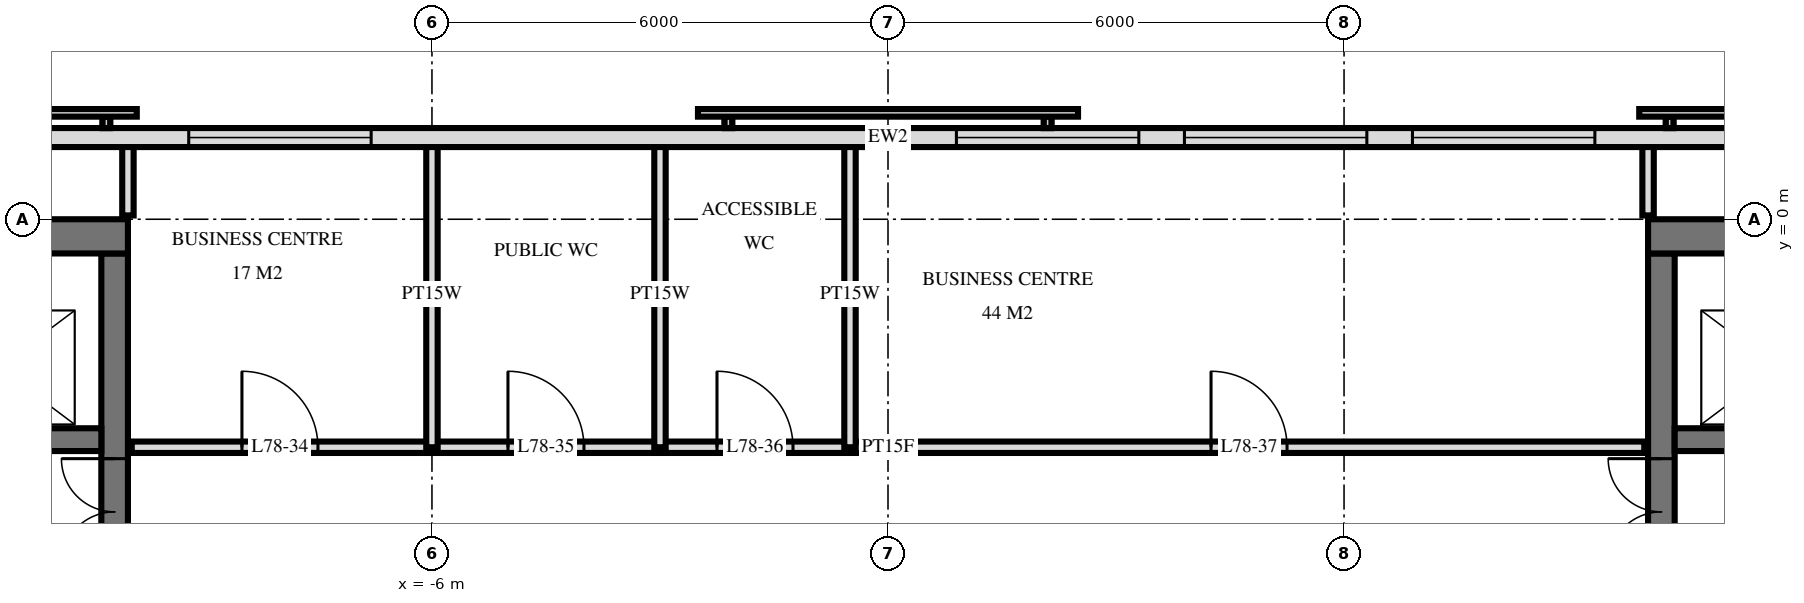
"""IFC4 building model, lengths in metres.
Left out: names, types, materials, properties, quantities, classifications, styles, units other than length and angle.
Written with IfcOpenShell. Run it as: python <this file> out.ifc"""

import sys

from ifc_helpers import new_model, si_unit, direction, frame, frame_2d, origin, place, context, subcontext, project, spatial, rectangle, extrude, element, fill, save


model = new_model("IFC4")
c1 = context("Model", 3, precision=1e-05, world=origin(), true_north=direction((0.0, 1.0)))
c2 = subcontext(c1, "Body", "Model", "MODEL_VIEW")
j1 = project(units=[si_unit("LENGTHUNIT", "METRE"), si_unit("PLANEANGLEUNIT", "RADIAN")], contexts=[c1])
p1 = place(None, origin())
s1 = spatial("IfcSite", under=j1, at=p1, CompositionType="ELEMENT")
p2 = place(p1, origin())
s2 = spatial("IfcBuilding", under=s1, at=p2, CompositionType="ELEMENT")
p3 = place(p2, frame((0.0, 0.0, 294.6)))
s3 = spatial("IfcBuildingStorey", under=s2, at=p3, CompositionType="ELEMENT", Elevation=294.6)
p4 = place(p3, frame((-19.5, -0.225, 0.0), z_axis=(0.0, 0.0, 1.0), x_axis=(1.0, 0.0, 0.0)))
e1 = element("IfcWall", 1, at=p4, inside=s3, PredefinedType="SHEAR", context=c2, shape_type="SweptSolid", body=[
    extrude(rectangle(XDim=9.5, YDim=0.45, at=frame_2d((4.75, 0.0))), origin(), (0.0, 0.0, 1.0), 3.5),
])
p5 = place(p3, frame((-10.175, -14.55, 0.0), z_axis=(0.0, 0.0, 1.0), x_axis=(0.0, 1.0, 0.0)))
e2 = element("IfcWall", 2, at=p5, inside=s3, PredefinedType="SHEAR", context=c2, shape_type="SweptSolid", body=[
    extrude(rectangle(XDim=14.1, YDim=0.35, at=frame_2d((7.05, 0.0))), origin(), (0.0, 0.0, 1.0), 3.5),
])
p6 = place(p5, frame((8.4, 0.0, 0.0)))
e3 = element("IfcOpeningElement", 3, at=p6, cuts=e2, PredefinedType="OPENING", context=c2, shape_type="SweptSolid", body=[
    extrude(rectangle(XDim=1.4, YDim=2.4, at=frame_2d((0.7, 1.2))), frame((0.0, 0.185, 0.0), z_axis=(0.0, -1.0, 0.0), x_axis=(1.0, 0.0, 0.0)), (0.0, 0.0, 1.0), 0.37),
])
p7 = place(p5, frame((10.0, 0.0, 0.0)))
e4 = element("IfcOpeningElement", 4, at=p7, cuts=e2, PredefinedType="OPENING", context=c2, shape_type="SweptSolid", body=[
    extrude(rectangle(XDim=1.4, YDim=2.4, at=frame_2d((0.7, 1.2))), frame((0.0, 0.185, 0.0), z_axis=(0.0, -1.0, 0.0), x_axis=(1.0, 0.0, 0.0)), (0.0, 0.0, 1.0), 0.37),
])
p8 = place(p5, frame((4.0, 0.0, 0.0)))
e5 = element("IfcOpeningElement", 5, at=p8, cuts=e2, PredefinedType="OPENING", context=c2, shape_type="SweptSolid", body=[
    extrude(rectangle(XDim=1.2, YDim=2.1, at=frame_2d((0.6, 1.05))), frame((0.0, 0.185, 0.0), z_axis=(0.0, -1.0, 0.0), x_axis=(1.0, 0.0, 0.0)), (0.0, 0.0, 1.0), 0.37),
])
p9 = place(p3, frame((-19.05, -2.9, 0.0), z_axis=(0.0, 0.0, 1.0), x_axis=(1.0, 0.0, 0.0)))
e6 = element("IfcWall", 6, at=p9, inside=s3, PredefinedType="SHEAR", context=c2, shape_type="SweptSolid", body=[
    extrude(rectangle(XDim=8.7, YDim=0.3, at=frame_2d((4.35, 0.0))), origin(), (0.0, 0.0, 1.0), 3.5),
])
p10 = place(p9, frame((6.8, 0.0, 0.0)))
e7 = element("IfcOpeningElement", 7, at=p10, cuts=e6, PredefinedType="OPENING", context=c2, shape_type="SweptSolid", body=[
    extrude(rectangle(XDim=1.1, YDim=2.1, at=frame_2d((0.55, 1.05))), frame((0.0, 0.16, 0.0), z_axis=(0.0, -1.0, 0.0), x_axis=(1.0, 0.0, 0.0)), (0.0, 0.0, 1.0), 0.32),
])
p11 = place(p9, frame((3.8, 0.0, 0.0)))
e8 = element("IfcOpeningElement", 8, at=p11, cuts=e6, PredefinedType="OPENING", context=c2, shape_type="SweptSolid", body=[
    extrude(rectangle(XDim=1.1, YDim=2.1, at=frame_2d((0.55, 1.05))), frame((0.0, 0.16, 0.0), z_axis=(0.0, -1.0, 0.0), x_axis=(1.0, 0.0, 0.0)), (0.0, 0.0, 1.0), 0.32),
])
p12 = place(p9, frame((1.863, 0.0, 0.0)))
e9 = element("IfcOpeningElement", 9, at=p12, cuts=e6, PredefinedType="OPENING", context=c2, shape_type="SweptSolid", body=[
    extrude(rectangle(XDim=0.9, YDim=2.1, at=frame_2d((0.45, 1.05))), frame((0.0, 0.16, 0.0), z_axis=(0.0, -1.0, 0.0), x_axis=(1.0, 0.0, 0.0)), (0.0, 0.0, 1.0), 0.32),
])
p13 = place(p9, frame((0.438, 0.0, 0.0)))
e10 = element("IfcOpeningElement", 10, at=p13, cuts=e6, PredefinedType="OPENING", context=c2, shape_type="SweptSolid", body=[
    extrude(rectangle(XDim=0.9, YDim=2.1, at=frame_2d((0.45, 1.05))), frame((0.0, 0.16, 0.0), z_axis=(0.0, -1.0, 0.0), x_axis=(1.0, 0.0, 0.0)), (0.0, 0.0, 1.0), 0.32),
])
p14 = place(p3, frame((10.0, -0.225, 0.0), z_axis=(0.0, 0.0, 1.0), x_axis=(1.0, 0.0, 0.0)))
e11 = element("IfcWall", 11, at=p14, inside=s3, PredefinedType="SHEAR", context=c2, shape_type="SweptSolid", body=[
    extrude(rectangle(XDim=9.5, YDim=0.45, at=frame_2d((4.75, 0.0))), origin(), (0.0, 0.0, 1.0), 3.5),
])
p15 = place(p3, frame((10.175, -14.55, 0.0), z_axis=(0.0, 0.0, 1.0), x_axis=(0.0, 1.0, 0.0)))
e12 = element("IfcWall", 12, at=p15, inside=s3, PredefinedType="SHEAR", context=c2, shape_type="SweptSolid", body=[
    extrude(rectangle(XDim=14.1, YDim=0.35, at=frame_2d((7.05, 0.0))), origin(), (0.0, 0.0, 1.0), 3.5),
])
p16 = place(p15, frame((8.4, 0.0, 0.0)))
e13 = element("IfcOpeningElement", 13, at=p16, cuts=e12, PredefinedType="OPENING", context=c2, shape_type="SweptSolid", body=[
    extrude(rectangle(XDim=1.4, YDim=2.4, at=frame_2d((0.7, 1.2))), frame((0.0, 0.185, 0.0), z_axis=(0.0, -1.0, 0.0), x_axis=(1.0, 0.0, 0.0)), (0.0, 0.0, 1.0), 0.37),
])
p17 = place(p15, frame((10.0, 0.0, 0.0)))
e14 = element("IfcOpeningElement", 14, at=p17, cuts=e12, PredefinedType="OPENING", context=c2, shape_type="SweptSolid", body=[
    extrude(rectangle(XDim=1.4, YDim=2.4, at=frame_2d((0.7, 1.2))), frame((0.0, 0.185, 0.0), z_axis=(0.0, -1.0, 0.0), x_axis=(1.0, 0.0, 0.0)), (0.0, 0.0, 1.0), 0.37),
])
p18 = place(p15, frame((4.0, 0.0, 0.0)))
e15 = element("IfcOpeningElement", 15, at=p18, cuts=e12, PredefinedType="OPENING", context=c2, shape_type="SweptSolid", body=[
    extrude(rectangle(XDim=1.2, YDim=2.1, at=frame_2d((0.6, 1.05))), frame((0.0, 0.185, 0.0), z_axis=(0.0, -1.0, 0.0), x_axis=(1.0, 0.0, 0.0)), (0.0, 0.0, 1.0), 0.37),
])
p19 = place(p3, frame((10.35, -2.9, 0.0), z_axis=(0.0, 0.0, 1.0), x_axis=(1.0, 0.0, 0.0)))
e16 = element("IfcWall", 16, at=p19, inside=s3, PredefinedType="SHEAR", context=c2, shape_type="SweptSolid", body=[
    extrude(rectangle(XDim=8.7, YDim=0.3, at=frame_2d((4.35, 0.0))), origin(), (0.0, 0.0, 1.0), 3.5),
])
p20 = place(p19, frame((0.8, 0.0, 0.0)))
e17 = element("IfcOpeningElement", 17, at=p20, cuts=e16, PredefinedType="OPENING", context=c2, shape_type="SweptSolid", body=[
    extrude(rectangle(XDim=1.1, YDim=2.1, at=frame_2d((0.55, 1.05))), frame((0.0, 0.16, 0.0), z_axis=(0.0, -1.0, 0.0), x_axis=(1.0, 0.0, 0.0)), (0.0, 0.0, 1.0), 0.32),
])
p21 = place(p19, frame((3.8, 0.0, 0.0)))
e18 = element("IfcOpeningElement", 18, at=p21, cuts=e16, PredefinedType="OPENING", context=c2, shape_type="SweptSolid", body=[
    extrude(rectangle(XDim=1.1, YDim=2.1, at=frame_2d((0.55, 1.05))), frame((0.0, 0.16, 0.0), z_axis=(0.0, -1.0, 0.0), x_axis=(1.0, 0.0, 0.0)), (0.0, 0.0, 1.0), 0.32),
])
p22 = place(p19, frame((5.938, 0.0, 0.0)))
e19 = element("IfcOpeningElement", 19, at=p22, cuts=e16, PredefinedType="OPENING", context=c2, shape_type="SweptSolid", body=[
    extrude(rectangle(XDim=0.9, YDim=2.1, at=frame_2d((0.45, 1.05))), frame((0.0, 0.16, 0.0), z_axis=(0.0, -1.0, 0.0), x_axis=(1.0, 0.0, 0.0)), (0.0, 0.0, 1.0), 0.32),
])
p23 = place(p19, frame((7.363, 0.0, 0.0)))
e20 = element("IfcOpeningElement", 20, at=p23, cuts=e16, PredefinedType="OPENING", context=c2, shape_type="SweptSolid", body=[
    extrude(rectangle(XDim=0.9, YDim=2.1, at=frame_2d((0.45, 1.05))), frame((0.0, 0.16, 0.0), z_axis=(0.0, -1.0, 0.0), x_axis=(1.0, 0.0, 0.0)), (0.0, 0.0, 1.0), 0.32),
])
p24 = place(p3, frame((18.575, 1.075, 0.0), z_axis=(0.0, 0.0, 1.0), x_axis=(-1.0, 0.0, 0.0)))
e21 = element("IfcWall", 21, at=p24, inside=s3, PredefinedType="SOLIDWALL", context=c2, shape_type="SweptSolid", body=[
    extrude(rectangle(XDim=37.151, YDim=0.25, at=frame_2d((18.575, 0.0))), origin(), (0.0, 0.0, 1.0), 3.22),
])
p25 = place(p24, frame((9.275, 0.0, 0.9)))
e22 = element("IfcOpeningElement", 22, at=p25, cuts=e21, PredefinedType="OPENING", context=c2, shape_type="SweptSolid", body=[
    extrude(rectangle(XDim=2.4, YDim=1.5, at=frame_2d((1.2, 0.75))), frame((0.0, 0.135, 0.0), z_axis=(0.0, -1.0, 0.0), x_axis=(1.0, 0.0, 0.0)), (0.0, 0.0, 1.0), 0.27),
])
p26 = place(p24, frame((12.275, 0.0, 0.9)))
e23 = element("IfcOpeningElement", 23, at=p26, cuts=e21, PredefinedType="OPENING", context=c2, shape_type="SweptSolid", body=[
    extrude(rectangle(XDim=2.4, YDim=1.5, at=frame_2d((1.2, 0.75))), frame((0.0, 0.135, 0.0), z_axis=(0.0, -1.0, 0.0), x_axis=(1.0, 0.0, 0.0)), (0.0, 0.0, 1.0), 0.27),
])
p27 = place(p24, frame((15.275, 0.0, 0.9)))
e24 = element("IfcOpeningElement", 24, at=p27, cuts=e21, PredefinedType="OPENING", context=c2, shape_type="SweptSolid", body=[
    extrude(rectangle(XDim=2.4, YDim=1.5, at=frame_2d((1.2, 0.75))), frame((0.0, 0.135, 0.0), z_axis=(0.0, -1.0, 0.0), x_axis=(1.0, 0.0, 0.0)), (0.0, 0.0, 1.0), 0.27),
])
p28 = place(p24, frame((25.375, 0.0, 0.9)))
e25 = element("IfcOpeningElement", 25, at=p28, cuts=e21, PredefinedType="OPENING", context=c2, shape_type="SweptSolid", body=[
    extrude(rectangle(XDim=2.4, YDim=1.5, at=frame_2d((1.2, 0.75))), frame((0.0, 0.135, 0.0), z_axis=(0.0, -1.0, 0.0), x_axis=(1.0, 0.0, 0.0)), (0.0, 0.0, 1.0), 0.27),
])
p29 = place(p3, frame((10.0, 0.05, 0.0), z_axis=(0.0, 0.0, 1.0), x_axis=(0.0, 1.0, 0.0)))
e26 = element("IfcWall", 26, at=p29, inside=s3, PredefinedType="PARTITIONING", context=c2, shape_type="SweptSolid", body=[
    extrude(rectangle(XDim=0.97, YDim=0.15, at=frame_2d((0.485, 0.0))), origin(), (0.0, 0.0, 1.0), 3.22),
])
for number, where, z_axis, x_axis in (
    (27, (-0.5, -3.0, 0.0), (0.0, 0.0, 1.0), (0.0, 1.0, 0.0)),
    (28, (-3.0, -3.0, 0.0), (0.0, 0.0, 1.0), (0.0, 1.0, 0.0)),
    (29, (-6.0, -3.0, 0.0), (0.0, 0.0, 1.0), (0.0, 1.0, 0.0)),
):
    element("IfcWall", number, at=place(p3, frame(where, z_axis=z_axis, x_axis=x_axis)), inside=s3, PredefinedType="PLUMBINGWALL", context=c2, shape_type="SweptSolid", body=[
        extrude(rectangle(XDim=4.02, YDim=0.15, at=frame_2d((2.01, 0.0))), origin(), (0.0, 0.0, 1.0), 3.22),
    ])
p30 = place(p3, frame((-10.0, 0.05, 0.0), z_axis=(0.0, 0.0, 1.0), x_axis=(0.0, 1.0, 0.0)))
e30 = element("IfcWall", 30, at=p30, inside=s3, PredefinedType="PARTITIONING", context=c2, shape_type="SweptSolid", body=[
    extrude(rectangle(XDim=0.97, YDim=0.15, at=frame_2d((0.485, 0.0))), origin(), (0.0, 0.0, 1.0), 3.22),
])
p31 = place(p3, frame((-9.95, -3.0, 0.0), z_axis=(0.0, 0.0, 1.0), x_axis=(1.0, 0.0, 0.0)))
e31 = element("IfcWall", 31, at=p31, inside=s3, PredefinedType="PARTITIONING", context=c2, shape_type="SweptSolid", body=[
    extrude(rectangle(XDim=19.9, YDim=0.15, at=frame_2d((9.95, 0.0))), origin(), (0.0, 0.0, 1.0), 3.22),
])
p32 = place(p31, frame((1.45, 0.0, 0.0)))
e32 = element("IfcOpeningElement", 32, at=p32, cuts=e31, PredefinedType="OPENING", context=c2, shape_type="SweptSolid", body=[
    extrude(rectangle(XDim=1.0, YDim=2.1, at=frame_2d((0.5, 1.05))), frame((0.0, 0.085, 0.0), z_axis=(0.0, -1.0, 0.0), x_axis=(1.0, 0.0, 0.0)), (0.0, 0.0, 1.0), 0.17),
])
p33 = place(p31, frame((4.95, 0.0, 0.0)))
e33 = element("IfcOpeningElement", 33, at=p33, cuts=e31, PredefinedType="OPENING", context=c2, shape_type="SweptSolid", body=[
    extrude(rectangle(XDim=1.0, YDim=2.1, at=frame_2d((0.5, 1.05))), frame((0.0, 0.085, 0.0), z_axis=(0.0, -1.0, 0.0), x_axis=(1.0, 0.0, 0.0)), (0.0, 0.0, 1.0), 0.17),
])
p34 = place(p31, frame((7.7, 0.0, 0.0)))
e34 = element("IfcOpeningElement", 34, at=p34, cuts=e31, PredefinedType="OPENING", context=c2, shape_type="SweptSolid", body=[
    extrude(rectangle(XDim=1.0, YDim=2.1, at=frame_2d((0.5, 1.05))), frame((0.0, 0.085, 0.0), z_axis=(0.0, -1.0, 0.0), x_axis=(1.0, 0.0, 0.0)), (0.0, 0.0, 1.0), 0.17),
])
p35 = place(p31, frame((14.2, 0.0, 0.0)))
e35 = element("IfcOpeningElement", 35, at=p35, cuts=e31, PredefinedType="OPENING", context=c2, shape_type="SweptSolid", body=[
    extrude(rectangle(XDim=1.0, YDim=2.1, at=frame_2d((0.5, 1.05))), frame((0.0, 0.085, 0.0), z_axis=(0.0, -1.0, 0.0), x_axis=(1.0, 0.0, 0.0)), (0.0, 0.0, 1.0), 0.17),
])
p36 = place(p25, origin())
e36 = element("IfcWindow", 36, at=p36, inside=s3, PartitioningType="SINGLE_PANEL", PredefinedType="WINDOW", context=c2, shape_type="SweptSolid", body=[
    extrude(rectangle(XDim=2.4, YDim=1.5, at=frame_2d((1.2, 0.75))), frame((0.0, 0.03, 0.0), z_axis=(0.0, -1.0, 0.0), x_axis=(1.0, 0.0, 0.0)), (0.0, 0.0, 1.0), 0.06),
])
fill(e22, e36)
p37 = place(p26, origin())
e37 = element("IfcWindow", 37, at=p37, inside=s3, PartitioningType="SINGLE_PANEL", PredefinedType="WINDOW", context=c2, shape_type="SweptSolid", body=[
    extrude(rectangle(XDim=2.4, YDim=1.5, at=frame_2d((1.2, 0.75))), frame((0.0, 0.03, 0.0), z_axis=(0.0, -1.0, 0.0), x_axis=(1.0, 0.0, 0.0)), (0.0, 0.0, 1.0), 0.06),
])
fill(e23, e37)
p38 = place(p27, origin())
e38 = element("IfcWindow", 38, at=p38, inside=s3, PartitioningType="SINGLE_PANEL", PredefinedType="WINDOW", context=c2, shape_type="SweptSolid", body=[
    extrude(rectangle(XDim=2.4, YDim=1.5, at=frame_2d((1.2, 0.75))), frame((0.0, 0.03, 0.0), z_axis=(0.0, -1.0, 0.0), x_axis=(1.0, 0.0, 0.0)), (0.0, 0.0, 1.0), 0.06),
])
fill(e24, e38)
p39 = place(p28, origin())
e39 = element("IfcWindow", 39, at=p39, inside=s3, PartitioningType="SINGLE_PANEL", PredefinedType="WINDOW", context=c2, shape_type="SweptSolid", body=[
    extrude(rectangle(XDim=2.4, YDim=1.5, at=frame_2d((1.2, 0.75))), frame((0.0, 0.03, 0.0), z_axis=(0.0, -1.0, 0.0), x_axis=(1.0, 0.0, 0.0)), (0.0, 0.0, 1.0), 0.06),
])
fill(e25, e39)
p40 = place(p7, origin())
e40 = element("IfcDoor", 40, at=p40, inside=s3, OperationType="DOUBLE_DOOR_SINGLE_SWING", PredefinedType="DOOR", context=c2, shape_type="SweptSolid", body=[
    extrude(rectangle(XDim=1.4, YDim=2.4, at=frame_2d((0.7, 1.2))), frame((0.0, 0.025, 0.0), z_axis=(0.0, -1.0, 0.0), x_axis=(1.0, 0.0, 0.0)), (0.0, 0.0, 1.0), 0.05),
])
fill(e4, e40)
p41 = place(p17, origin())
e41 = element("IfcDoor", 41, at=p41, inside=s3, OperationType="DOUBLE_DOOR_SINGLE_SWING", PredefinedType="DOOR", context=c2, shape_type="SweptSolid", body=[
    extrude(rectangle(XDim=1.4, YDim=2.4, at=frame_2d((0.7, 1.2))), frame((0.0, 0.025, 0.0), z_axis=(0.0, -1.0, 0.0), x_axis=(1.0, 0.0, 0.0)), (0.0, 0.0, 1.0), 0.05),
])
fill(e14, e41)
p42 = place(p32, origin())
e42 = element("IfcDoor", 42, at=p42, inside=s3, OperationType="SINGLE_SWING_RIGHT", PredefinedType="DOOR", context=c2, shape_type="SweptSolid", body=[
    extrude(rectangle(XDim=1.0, YDim=2.1, at=frame_2d((0.5, 1.05))), frame((0.0, 0.025, 0.0), z_axis=(0.0, -1.0, 0.0), x_axis=(1.0, 0.0, 0.0)), (0.0, 0.0, 1.0), 0.05),
])
fill(e32, e42)
p43 = place(p33, origin())
e43 = element("IfcDoor", 43, at=p43, inside=s3, OperationType="SINGLE_SWING_RIGHT", PredefinedType="DOOR", context=c2, shape_type="SweptSolid", body=[
    extrude(rectangle(XDim=1.0, YDim=2.1, at=frame_2d((0.5, 1.05))), frame((0.0, 0.025, 0.0), z_axis=(0.0, -1.0, 0.0), x_axis=(1.0, 0.0, 0.0)), (0.0, 0.0, 1.0), 0.05),
])
fill(e33, e43)
p44 = place(p34, origin())
e44 = element("IfcDoor", 44, at=p44, inside=s3, OperationType="SINGLE_SWING_RIGHT", PredefinedType="DOOR", context=c2, shape_type="SweptSolid", body=[
    extrude(rectangle(XDim=1.0, YDim=2.1, at=frame_2d((0.5, 1.05))), frame((0.0, 0.025, 0.0), z_axis=(0.0, -1.0, 0.0), x_axis=(1.0, 0.0, 0.0)), (0.0, 0.0, 1.0), 0.05),
])
fill(e34, e44)
p45 = place(p35, origin())
e45 = element("IfcDoor", 45, at=p45, inside=s3, OperationType="SINGLE_SWING_RIGHT", PredefinedType="DOOR", context=c2, shape_type="SweptSolid", body=[
    extrude(rectangle(XDim=1.0, YDim=2.1, at=frame_2d((0.5, 1.05))), frame((0.0, 0.025, 0.0), z_axis=(0.0, -1.0, 0.0), x_axis=(1.0, 0.0, 0.0)), (0.0, 0.0, 1.0), 0.05),
])
fill(e35, e45)
save(model, sys.argv[1])
